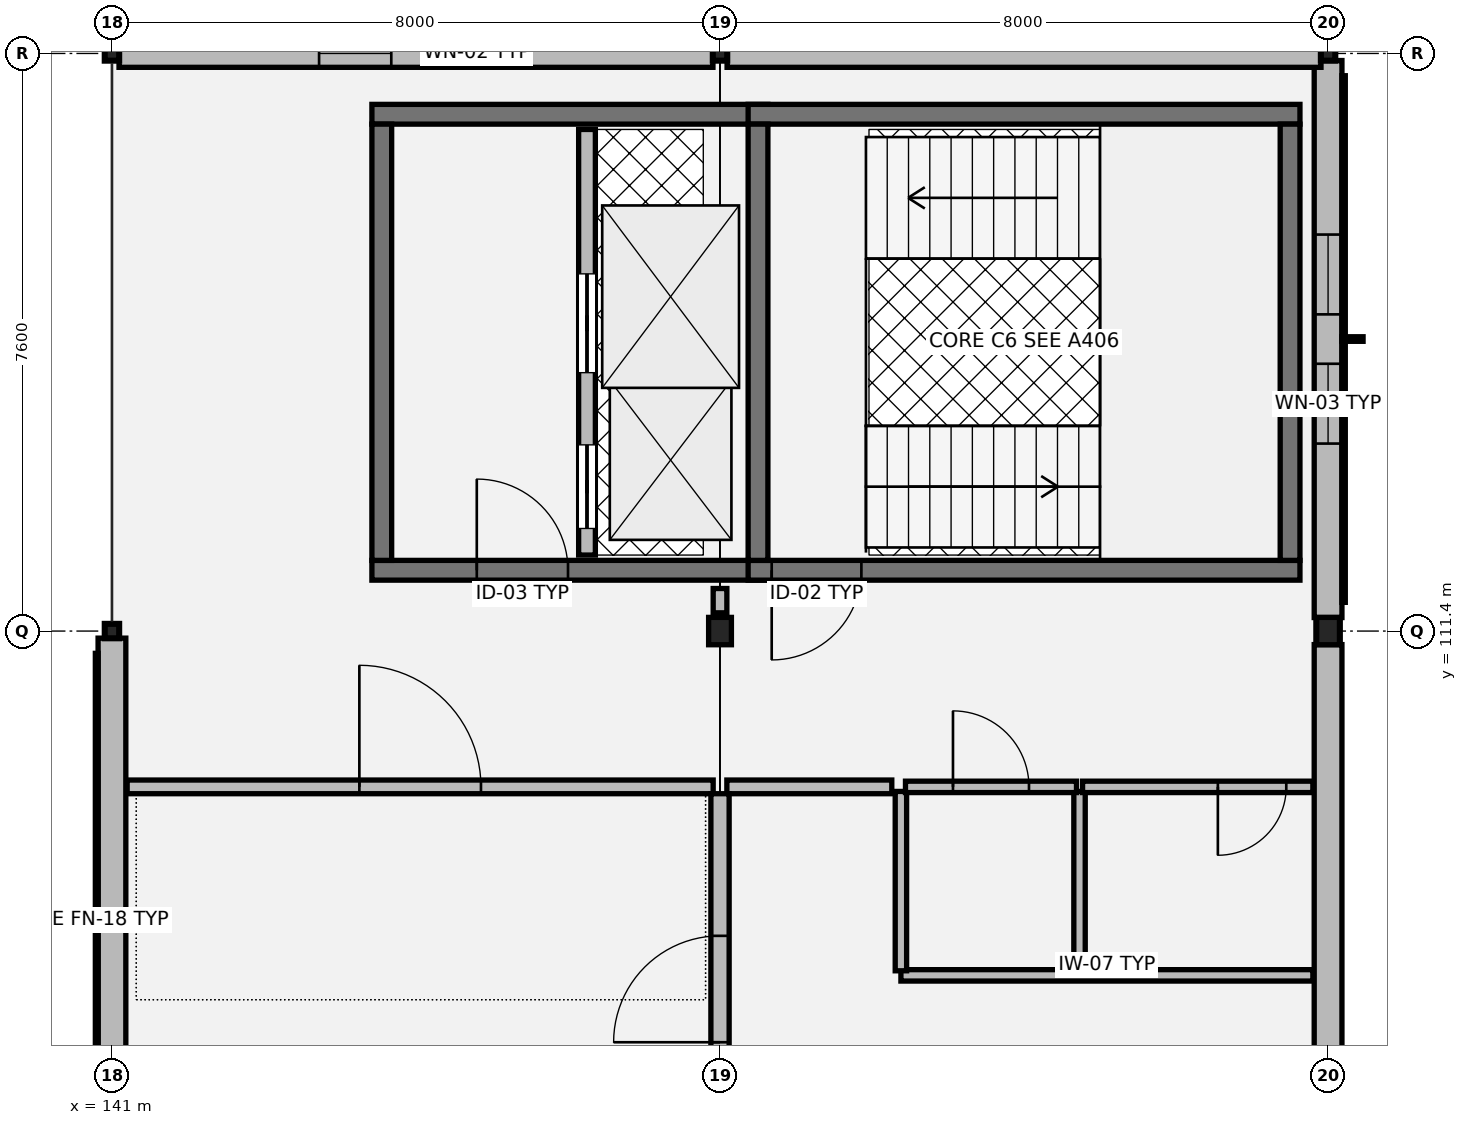
"""IFC4 building model, lengths in metres.
Left out: names, types, materials, properties, quantities, classifications, styles, units other than length and angle.
Written with IfcOpenShell. Run it as: python <this file> out.ifc"""

import sys

from ifc_helpers import new_model, si_unit, direction, frame, frame_2d, origin, origin_2d, place, context, subcontext, project, spatial, rectangle, hollow_rectangle, i_section, extrude, element, fill, save


model = new_model("IFC4")
c1 = context("Model", 3, precision=1e-05, world=origin(), true_north=direction((0.0, 1.0)))
c2 = subcontext(c1, "Body", "Model", "MODEL_VIEW")
j1 = project(units=[si_unit("LENGTHUNIT", "METRE"), si_unit("PLANEANGLEUNIT", "RADIAN")], contexts=[c1])
p1 = place(None, origin())
s1 = spatial("IfcSite", under=j1, at=p1, CompositionType="ELEMENT")
p2 = place(p1, origin())
s2 = spatial("IfcBuilding", under=s1, at=p2, CompositionType="ELEMENT")
p3 = place(p2, frame((0.0, 0.0, 21.42)))
s3 = spatial("IfcBuildingStorey", under=s2, at=p3, CompositionType="ELEMENT", Elevation=21.42)
for number, where, z_axis, x_axis in (
    (1, (141.0, 111.4, 0.0), (0.0, 0.0, 1.0), (1.0, 0.0, 0.0)),
    (2, (141.0, 119.0, 0.0), (0.0, 0.0, 1.0), (1.0, 0.0, 0.0)),
):
    element("IfcColumn", number, at=place(p3, frame(where, z_axis=z_axis, x_axis=x_axis)), inside=s3, PredefinedType="COLUMN", context=c2, shape_type="SweptSolid", body=[
        extrude(hollow_rectangle(XDim=0.18, YDim=0.18, WallThickness=0.01, at=origin_2d()), origin(), (0.0, 0.0, 1.0), 3.88),
    ])
p4 = place(p3, frame((149.0, 111.4, 0.0), z_axis=(0.0, 0.0, 1.0), x_axis=(1.0, 0.0, 0.0)))
e3 = element("IfcColumn", 3, at=p4, inside=s3, PredefinedType="COLUMN", context=c2, shape_type="SweptSolid", body=[
    extrude(i_section(OverallWidth=0.3, OverallDepth=0.36, WebThickness=0.012, FlangeThickness=0.022, at=origin_2d()), origin(), (0.0, 0.0, 1.0), 3.88),
])
p5 = place(p3, frame((149.0, 119.0, 0.0), z_axis=(0.0, 0.0, 1.0), x_axis=(1.0, 0.0, 0.0)))
e4 = element("IfcColumn", 4, at=p5, inside=s3, PredefinedType="COLUMN", context=c2, shape_type="SweptSolid", body=[
    extrude(hollow_rectangle(XDim=0.18, YDim=0.18, WallThickness=0.01, at=origin_2d()), origin(), (0.0, 0.0, 1.0), 3.88),
])
p6 = place(p3, frame((157.0, 111.4, 0.0), z_axis=(0.0, 0.0, 1.0), x_axis=(1.0, 0.0, 0.0)))
e5 = element("IfcColumn", 5, at=p6, inside=s3, PredefinedType="COLUMN", context=c2, shape_type="SweptSolid", body=[
    extrude(i_section(OverallWidth=0.3, OverallDepth=0.36, WebThickness=0.012, FlangeThickness=0.022, at=origin_2d()), origin(), (0.0, 0.0, 1.0), 3.88),
])
p7 = place(p3, frame((157.0, 119.0, 0.0), z_axis=(0.0, 0.0, 1.0), x_axis=(1.0, 0.0, 0.0)))
e6 = element("IfcColumn", 6, at=p7, inside=s3, PredefinedType="COLUMN", context=c2, shape_type="SweptSolid", body=[
    extrude(hollow_rectangle(XDim=0.18, YDim=0.18, WallThickness=0.01, at=origin_2d()), origin(), (0.0, 0.0, 1.0), 3.88),
])
p8 = place(p3, frame((157.0, 103.978, 0.0), z_axis=(0.0, 0.0, 1.0), x_axis=(0.0, 1.0, 0.0)))
e7 = element("IfcWall", 7, at=p8, inside=s3, PredefinedType="SOLIDWALL", context=c2, shape_type="SweptSolid", body=[
    extrude(rectangle(XDim=7.244, YDim=0.365, at=frame_2d((3.622, 0.0))), origin(), (0.0, 0.0, 1.0), 3.27),
])
p9 = place(p3, frame((157.0, 111.578, 0.0), z_axis=(0.0, 0.0, 1.0), x_axis=(0.0, 1.0, 0.0)))
e8 = element("IfcWall", 8, at=p9, inside=s3, PredefinedType="SOLIDWALL", context=c2, shape_type="SweptSolid", body=[
    extrude(rectangle(XDim=7.329, YDim=0.365, at=frame_2d((3.665, 0.0))), origin(), (0.0, 0.0, 1.0), 3.27),
])
p10 = place(p9, frame((2.289, 0.0, 0.8)))
e9 = element("IfcOpeningElement", 9, at=p10, cuts=e8, PredefinedType="OPENING", context=c2, shape_type="SweptSolid", body=[
    extrude(rectangle(XDim=1.05, YDim=2.05, at=frame_2d((0.525, 1.025))), frame((0.0, 0.192, 0.0), z_axis=(0.0, -1.0, 0.0), x_axis=(1.0, 0.0, 0.0)), (0.0, 0.0, 1.0), 0.385),
])
p11 = place(p9, frame((3.989, 0.0, 0.8)))
e10 = element("IfcOpeningElement", 10, at=p11, cuts=e8, PredefinedType="OPENING", context=c2, shape_type="SweptSolid", body=[
    extrude(rectangle(XDim=1.05, YDim=2.05, at=frame_2d((0.525, 1.025))), frame((0.0, 0.192, 0.0), z_axis=(0.0, -1.0, 0.0), x_axis=(1.0, 0.0, 0.0)), (0.0, 0.0, 1.0), 0.385),
])
p12 = place(p3, frame((156.907, 119.0, 0.0), z_axis=(0.0, 0.0, 1.0), x_axis=(-1.0, 0.0, 0.0)))
e11 = element("IfcWall", 11, at=p12, inside=s3, PredefinedType="SOLIDWALL", context=c2, shape_type="SweptSolid", body=[
    extrude(rectangle(XDim=7.814, YDim=0.365, at=frame_2d((3.907, 0.0))), origin(), (0.0, 0.0, 1.0), 3.48),
])
p13 = place(p3, frame((148.907, 119.0, 0.0), z_axis=(0.0, 0.0, 1.0), x_axis=(-1.0, 0.0, 0.0)))
e12 = element("IfcWall", 12, at=p13, inside=s3, PredefinedType="SOLIDWALL", context=c2, shape_type="SweptSolid", body=[
    extrude(rectangle(XDim=7.814, YDim=0.365, at=frame_2d((3.907, 0.0))), origin(), (0.0, 0.0, 1.0), 3.48),
])
p14 = place(p13, frame((2.632, 0.0, 0.8)))
e13 = element("IfcOpeningElement", 13, at=p14, cuts=e12, PredefinedType="OPENING", context=c2, shape_type="SweptSolid", body=[
    extrude(rectangle(XDim=0.95, YDim=2.0, at=frame_2d((0.475, 1.0))), frame((0.0, 0.192, 0.0), z_axis=(0.0, -1.0, 0.0), x_axis=(1.0, 0.0, 0.0)), (0.0, 0.0, 1.0), 0.385),
])
p15 = place(p13, frame((4.232, 0.0, 0.8)))
e14 = element("IfcOpeningElement", 14, at=p15, cuts=e12, PredefinedType="OPENING", context=c2, shape_type="SweptSolid", body=[
    extrude(rectangle(XDim=0.95, YDim=2.0, at=frame_2d((0.475, 1.0))), frame((0.0, 0.192, 0.0), z_axis=(0.0, -1.0, 0.0), x_axis=(1.0, 0.0, 0.0)), (0.0, 0.0, 1.0), 0.385),
])
p16 = place(p3, frame((141.0, 111.307, 0.0), z_axis=(0.0, 0.0, 1.0), x_axis=(0.0, -1.0, 0.0)))
e15 = element("IfcWall", 15, at=p16, inside=s3, PredefinedType="SOLIDWALL", context=c2, shape_type="SweptSolid", body=[
    extrude(rectangle(XDim=7.414, YDim=0.365, at=frame_2d((3.707, 0.0))), origin(), (0.0, 0.0, 1.0), 3.48),
])
p17 = place(p3, frame((144.42, 112.2, 0.0), z_axis=(0.0, 0.0, 1.0), x_axis=(1.0, 0.0, 0.0)))
e16 = element("IfcWall", 16, at=p17, inside=s3, PredefinedType="SHEAR", context=c2, shape_type="SweptSolid", body=[
    extrude(rectangle(XDim=5.21, YDim=0.26, at=frame_2d((2.605, 0.0))), origin(), (0.0, 0.0, 1.0), 3.845),
])
p18 = place(p17, frame((1.38, 0.0, 0.0)))
e17 = element("IfcOpeningElement", 17, at=p18, cuts=e16, PredefinedType="OPENING", context=c2, shape_type="SweptSolid", body=[
    extrude(rectangle(XDim=1.2, YDim=2.16, at=frame_2d((0.6, 1.08))), frame((0.0, 0.14, 0.0), z_axis=(0.0, -1.0, 0.0), x_axis=(1.0, 0.0, 0.0)), (0.0, 0.0, 1.0), 0.28),
])
p19 = place(p3, frame((149.63, 118.2, 0.0), z_axis=(0.0, 0.0, 1.0), x_axis=(-1.0, 0.0, 0.0)))
e18 = element("IfcWall", 18, at=p19, inside=s3, PredefinedType="SHEAR", context=c2, shape_type="SweptSolid", body=[
    extrude(rectangle(XDim=5.21, YDim=0.26, at=frame_2d((2.605, 0.0))), origin(), (0.0, 0.0, 1.0), 3.845),
])
p20 = place(p3, frame((144.55, 118.07, 0.0), z_axis=(0.0, 0.0, 1.0), x_axis=(0.0, -1.0, 0.0)))
e19 = element("IfcWall", 19, at=p20, inside=s3, PredefinedType="SHEAR", context=c2, shape_type="SweptSolid", body=[
    extrude(rectangle(XDim=5.74, YDim=0.26, at=frame_2d((2.87, 0.0))), origin(), (0.0, 0.0, 1.0), 3.845),
])
p21 = place(p3, frame((147.25, 112.4, 0.0), z_axis=(0.0, 0.0, 1.0), x_axis=(0.0, 1.0, 0.0)))
e20 = element("IfcWall", 20, at=p21, inside=s3, PredefinedType="SOLIDWALL", context=c2, shape_type="SweptSolid", body=[
    extrude(rectangle(XDim=5.6, YDim=0.22, at=frame_2d((2.8, 0.0))), origin(), (0.0, 0.0, 1.0), 3.845),
])
p22 = place(p21, frame((0.35, 0.0, 0.0)))
e21 = element("IfcOpeningElement", 21, at=p22, cuts=e20, PredefinedType="OPENING", context=c2, shape_type="SweptSolid", body=[
    extrude(rectangle(XDim=1.1, YDim=2.15, at=frame_2d((0.55, 1.075))), frame((0.0, 0.12, 0.0), z_axis=(0.0, -1.0, 0.0), x_axis=(1.0, 0.0, 0.0)), (0.0, 0.0, 1.0), 0.24),
])
p23 = place(p21, frame((2.4, 0.0, 0.0)))
e22 = element("IfcOpeningElement", 22, at=p23, cuts=e20, PredefinedType="OPENING", context=c2, shape_type="SweptSolid", body=[
    extrude(rectangle(XDim=1.3, YDim=2.18, at=frame_2d((0.65, 1.09))), frame((0.0, 0.12, 0.0), z_axis=(0.0, -1.0, 0.0), x_axis=(1.0, 0.0, 0.0)), (0.0, 0.0, 1.0), 0.24),
])
p24 = place(p3, frame((149.37, 112.2, 0.0), z_axis=(0.0, 0.0, 1.0), x_axis=(1.0, 0.0, 0.0)))
e23 = element("IfcWall", 23, at=p24, inside=s3, PredefinedType="SHEAR", context=c2, shape_type="SweptSolid", body=[
    extrude(rectangle(XDim=7.26, YDim=0.26, at=frame_2d((3.63, 0.0))), origin(), (0.0, 0.0, 1.0), 3.845),
])
p25 = place(p24, frame((0.31, 0.0, 0.0)))
e24 = element("IfcOpeningElement", 24, at=p25, cuts=e23, PredefinedType="OPENING", context=c2, shape_type="SweptSolid", body=[
    extrude(rectangle(XDim=1.18, YDim=2.18, at=frame_2d((0.59, 1.09))), frame((0.0, 0.14, 0.0), z_axis=(0.0, -1.0, 0.0), x_axis=(1.0, 0.0, 0.0)), (0.0, 0.0, 1.0), 0.28),
])
p26 = place(p3, frame((149.37, 118.2, 0.0), z_axis=(0.0, 0.0, 1.0), x_axis=(1.0, 0.0, 0.0)))
e25 = element("IfcWall", 25, at=p26, inside=s3, PredefinedType="SHEAR", context=c2, shape_type="SweptSolid", body=[
    extrude(rectangle(XDim=7.26, YDim=0.26, at=frame_2d((3.63, 0.0))), origin(), (0.0, 0.0, 1.0), 3.845),
])
for number, where, z_axis, x_axis in (
    (26, (149.5, 112.33, 0.0), (0.0, 0.0, 1.0), (0.0, 1.0, 0.0)),
    (27, (156.5, 112.33, 0.0), (0.0, 0.0, 1.0), (0.0, 1.0, 0.0)),
):
    element("IfcWall", number, at=place(p3, frame(where, z_axis=z_axis, x_axis=x_axis)), inside=s3, PredefinedType="SHEAR", context=c2, shape_type="SweptSolid", body=[
        extrude(rectangle(XDim=5.74, YDim=0.26, at=frame_2d((2.87, 0.0))), origin(), (0.0, 0.0, 1.0), 3.845),
    ])
p27 = place(p3, frame((151.38, 106.87, 0.0), z_axis=(0.0, 0.0, 1.0), x_axis=(1.0, 0.0, 0.0)))
e28 = element("IfcWall", 28, at=p27, inside=s3, PredefinedType="PARTITIONING", context=c2, shape_type="SweptSolid", body=[
    extrude(rectangle(XDim=5.42, YDim=0.15, at=frame_2d((2.71, 0.0))), origin(), (0.0, 0.0, 1.0), 3.18),
])
for number, where, z_axis, x_axis in (
    (29, (151.38, 106.93, 0.0), (0.0, 0.0, 1.0), (0.0, 1.0, 0.0)),
    (30, (153.73, 106.93, 0.0), (0.0, 0.0, 1.0), (0.0, 1.0, 0.0)),
):
    element("IfcWall", number, at=place(p3, frame(where, z_axis=z_axis, x_axis=x_axis)), inside=s3, PredefinedType="PARTITIONING", context=c2, shape_type="SweptSolid", body=[
        extrude(rectangle(XDim=2.36, YDim=0.15, at=frame_2d((1.18, 0.0))), origin(), (0.0, 0.0, 1.0), 3.18),
    ])
p28 = place(p3, frame((151.44, 109.35, 0.0), z_axis=(0.0, 0.0, 1.0), x_axis=(1.0, 0.0, 0.0)))
e31 = element("IfcWall", 31, at=p28, inside=s3, PredefinedType="PARTITIONING", context=c2, shape_type="SweptSolid", body=[
    extrude(rectangle(XDim=2.25, YDim=0.15, at=frame_2d((1.125, 0.0))), origin(), (0.0, 0.0, 1.0), 3.18),
])
p29 = place(p28, frame((0.625, 0.0, 0.0)))
e32 = element("IfcOpeningElement", 32, at=p29, cuts=e31, PredefinedType="OPENING", context=c2, shape_type="SweptSolid", body=[
    extrude(rectangle(XDim=1.0, YDim=2.15, at=frame_2d((0.5, 1.075))), frame((0.0, 0.085, 0.0), z_axis=(0.0, -1.0, 0.0), x_axis=(1.0, 0.0, 0.0)), (0.0, 0.0, 1.0), 0.17),
])
p30 = place(p3, frame((153.77, 109.35, 0.0), z_axis=(0.0, 0.0, 1.0), x_axis=(1.0, 0.0, 0.0)))
e33 = element("IfcWall", 33, at=p30, inside=s3, PredefinedType="PARTITIONING", context=c2, shape_type="SweptSolid", body=[
    extrude(rectangle(XDim=3.03, YDim=0.15, at=frame_2d((1.515, 0.0))), origin(), (0.0, 0.0, 1.0), 3.18),
])
p31 = place(p30, frame((1.78, 0.0, 0.0)))
e34 = element("IfcOpeningElement", 34, at=p31, cuts=e33, PredefinedType="OPENING", context=c2, shape_type="SweptSolid", body=[
    extrude(rectangle(XDim=0.9, YDim=2.15, at=frame_2d((0.45, 1.075))), frame((0.0, 0.085, 0.0), z_axis=(0.0, -1.0, 0.0), x_axis=(1.0, 0.0, 0.0)), (0.0, 0.0, 1.0), 0.17),
])
p32 = place(p3, frame((141.2, 109.35, 0.0), z_axis=(0.0, 0.0, 1.0), x_axis=(1.0, 0.0, 0.0)))
e35 = element("IfcWall", 35, at=p32, inside=s3, PredefinedType="PARTITIONING", context=c2, shape_type="SweptSolid", body=[
    extrude(rectangle(XDim=7.71, YDim=0.18, at=frame_2d((3.855, 0.0))), origin(), (0.0, 0.0, 1.0), 3.18),
])
p33 = place(p32, frame((3.055, 0.0, 0.0)))
e36 = element("IfcOpeningElement", 36, at=p33, cuts=e35, PredefinedType="OPENING", context=c2, shape_type="SweptSolid", body=[
    extrude(rectangle(XDim=1.6, YDim=2.25, at=frame_2d((0.8, 1.125))), frame((0.0, 0.1, 0.0), z_axis=(0.0, -1.0, 0.0), x_axis=(1.0, 0.0, 0.0)), (0.0, 0.0, 1.0), 0.2),
])
p34 = place(p3, frame((149.09, 109.35, 0.0), z_axis=(0.0, 0.0, 1.0), x_axis=(1.0, 0.0, 0.0)))
e37 = element("IfcWall", 37, at=p34, inside=s3, PredefinedType="PARTITIONING", context=c2, shape_type="SweptSolid", body=[
    extrude(rectangle(XDim=2.17, YDim=0.18, at=frame_2d((1.085, 0.0))), origin(), (0.0, 0.0, 1.0), 3.18),
])
p35 = place(p3, frame((149.0, 111.64, 0.0), z_axis=(0.0, 0.0, 1.0), x_axis=(0.0, 1.0, 0.0)))
e38 = element("IfcWall", 38, at=p35, inside=s3, PredefinedType="PARTITIONING", context=c2, shape_type="SweptSolid", body=[
    extrude(rectangle(XDim=0.32, YDim=0.18, at=frame_2d((0.16, 0.0))), origin(), (0.0, 0.0, 1.0), 3.18),
])
p36 = place(p3, frame((149.0, 104.12, 0.0), z_axis=(0.0, 0.0, 1.0), x_axis=(0.0, 1.0, 0.0)))
e39 = element("IfcWall", 39, at=p36, inside=s3, PredefinedType="SOLIDWALL", context=c2, shape_type="SweptSolid", body=[
    extrude(rectangle(XDim=5.14, YDim=0.24, at=frame_2d((2.57, 0.0))), origin(), (0.0, 0.0, 1.0), 3.18),
])
p37 = place(p36, frame((1.87, 0.0, 0.0)))
e40 = element("IfcOpeningElement", 40, at=p37, cuts=e39, PredefinedType="OPENING", context=c2, shape_type="SweptSolid", body=[
    extrude(rectangle(XDim=1.4, YDim=2.22, at=frame_2d((0.7, 1.11))), frame((0.0, 0.13, 0.0), z_axis=(0.0, -1.0, 0.0), x_axis=(1.0, 0.0, 0.0)), (0.0, 0.0, 1.0), 0.26),
])
p38 = place(p10, origin())
e41 = element("IfcWindow", 41, at=p38, inside=s3, PartitioningType="SINGLE_PANEL", PredefinedType="WINDOW", context=c2, shape_type="SweptSolid", body=[
    extrude(rectangle(XDim=1.05, YDim=2.05, at=frame_2d((0.525, 1.025))), frame((0.0, 0.03, 0.0), z_axis=(0.0, -1.0, 0.0), x_axis=(1.0, 0.0, 0.0)), (0.0, 0.0, 1.0), 0.06),
])
fill(e9, e41)
p39 = place(p11, origin())
e42 = element("IfcWindow", 42, at=p39, inside=s3, PartitioningType="SINGLE_PANEL", PredefinedType="WINDOW", context=c2, shape_type="SweptSolid", body=[
    extrude(rectangle(XDim=1.05, YDim=2.05, at=frame_2d((0.525, 1.025))), frame((0.0, 0.03, 0.0), z_axis=(0.0, -1.0, 0.0), x_axis=(1.0, 0.0, 0.0)), (0.0, 0.0, 1.0), 0.06),
])
fill(e10, e42)
p40 = place(p14, origin())
e43 = element("IfcWindow", 43, at=p40, inside=s3, PartitioningType="SINGLE_PANEL", PredefinedType="WINDOW", context=c2, shape_type="SweptSolid", body=[
    extrude(rectangle(XDim=0.95, YDim=2.0, at=frame_2d((0.475, 1.0))), frame((0.0, 0.03, 0.0), z_axis=(0.0, -1.0, 0.0), x_axis=(1.0, 0.0, 0.0)), (0.0, 0.0, 1.0), 0.06),
])
fill(e13, e43)
p41 = place(p15, origin())
e44 = element("IfcWindow", 44, at=p41, inside=s3, PartitioningType="SINGLE_PANEL", PredefinedType="WINDOW", context=c2, shape_type="SweptSolid", body=[
    extrude(rectangle(XDim=0.95, YDim=2.0, at=frame_2d((0.475, 1.0))), frame((0.0, 0.03, 0.0), z_axis=(0.0, -1.0, 0.0), x_axis=(1.0, 0.0, 0.0)), (0.0, 0.0, 1.0), 0.06),
])
fill(e14, e44)
p42 = place(p18, origin())
e45 = element("IfcDoor", 45, at=p42, inside=s3, OperationType="SINGLE_SWING_LEFT", PredefinedType="DOOR", context=c2, shape_type="SweptSolid", body=[
    extrude(rectangle(XDim=1.2, YDim=2.16, at=frame_2d((0.6, 1.08))), frame((0.0, 0.025, 0.0), z_axis=(0.0, -1.0, 0.0), x_axis=(1.0, 0.0, 0.0)), (0.0, 0.0, 1.0), 0.05),
])
fill(e17, e45)
p43 = place(p22, origin())
e46 = element("IfcDoor", 46, at=p43, inside=s3, OperationType="SLIDING_TO_LEFT", PredefinedType="DOOR", context=c2, shape_type="SweptSolid", body=[
    extrude(rectangle(XDim=1.1, YDim=2.15, at=frame_2d((0.55, 1.075))), frame((0.0, 0.025, 0.0), z_axis=(0.0, -1.0, 0.0), x_axis=(1.0, 0.0, 0.0)), (0.0, 0.0, 1.0), 0.05),
])
fill(e21, e46)
p44 = place(p23, origin())
e47 = element("IfcDoor", 47, at=p44, inside=s3, OperationType="SLIDING_TO_LEFT", PredefinedType="DOOR", context=c2, shape_type="SweptSolid", body=[
    extrude(rectangle(XDim=1.3, YDim=2.18, at=frame_2d((0.65, 1.09))), frame((0.0, 0.025, 0.0), z_axis=(0.0, -1.0, 0.0), x_axis=(1.0, 0.0, 0.0)), (0.0, 0.0, 1.0), 0.05),
])
fill(e22, e47)
p45 = place(p25, origin())
e48 = element("IfcDoor", 48, at=p45, inside=s3, OperationType="SINGLE_SWING_RIGHT", PredefinedType="DOOR", context=c2, shape_type="SweptSolid", body=[
    extrude(rectangle(XDim=1.18, YDim=2.18, at=frame_2d((0.59, 1.09))), frame((0.0, 0.025, 0.0), z_axis=(0.0, -1.0, 0.0), x_axis=(1.0, 0.0, 0.0)), (0.0, 0.0, 1.0), 0.05),
])
fill(e24, e48)
p46 = place(p29, origin())
e49 = element("IfcDoor", 49, at=p46, inside=s3, OperationType="SINGLE_SWING_LEFT", PredefinedType="DOOR", context=c2, shape_type="SweptSolid", body=[
    extrude(rectangle(XDim=1.0, YDim=2.15, at=frame_2d((0.5, 1.075))), frame((0.0, 0.025, 0.0), z_axis=(0.0, -1.0, 0.0), x_axis=(1.0, 0.0, 0.0)), (0.0, 0.0, 1.0), 0.05),
])
fill(e32, e49)
p47 = place(p31, origin())
e50 = element("IfcDoor", 50, at=p47, inside=s3, OperationType="SINGLE_SWING_RIGHT", PredefinedType="DOOR", context=c2, shape_type="SweptSolid", body=[
    extrude(rectangle(XDim=0.9, YDim=2.15, at=frame_2d((0.45, 1.075))), frame((0.0, 0.025, 0.0), z_axis=(0.0, -1.0, 0.0), x_axis=(1.0, 0.0, 0.0)), (0.0, 0.0, 1.0), 0.05),
])
fill(e34, e50)
p48 = place(p33, origin())
e51 = element("IfcDoor", 51, at=p48, inside=s3, OperationType="DOUBLE_DOOR_SINGLE_SWING", PredefinedType="DOOR", context=c2, shape_type="SweptSolid", body=[
    extrude(rectangle(XDim=1.6, YDim=2.25, at=frame_2d((0.8, 1.125))), frame((0.0, 0.025, 0.0), z_axis=(0.0, -1.0, 0.0), x_axis=(1.0, 0.0, 0.0)), (0.0, 0.0, 1.0), 0.05),
])
fill(e36, e51)
p49 = place(p37, origin())
e52 = element("IfcDoor", 52, at=p49, inside=s3, OperationType="SINGLE_SWING_LEFT", PredefinedType="DOOR", context=c2, shape_type="SweptSolid", body=[
    extrude(rectangle(XDim=1.4, YDim=2.22, at=frame_2d((0.7, 1.11))), frame((0.0, 0.025, 0.0), z_axis=(0.0, -1.0, 0.0), x_axis=(1.0, 0.0, 0.0)), (0.0, 0.0, 1.0), 0.05),
])
fill(e40, e52)
save(model, sys.argv[1])
